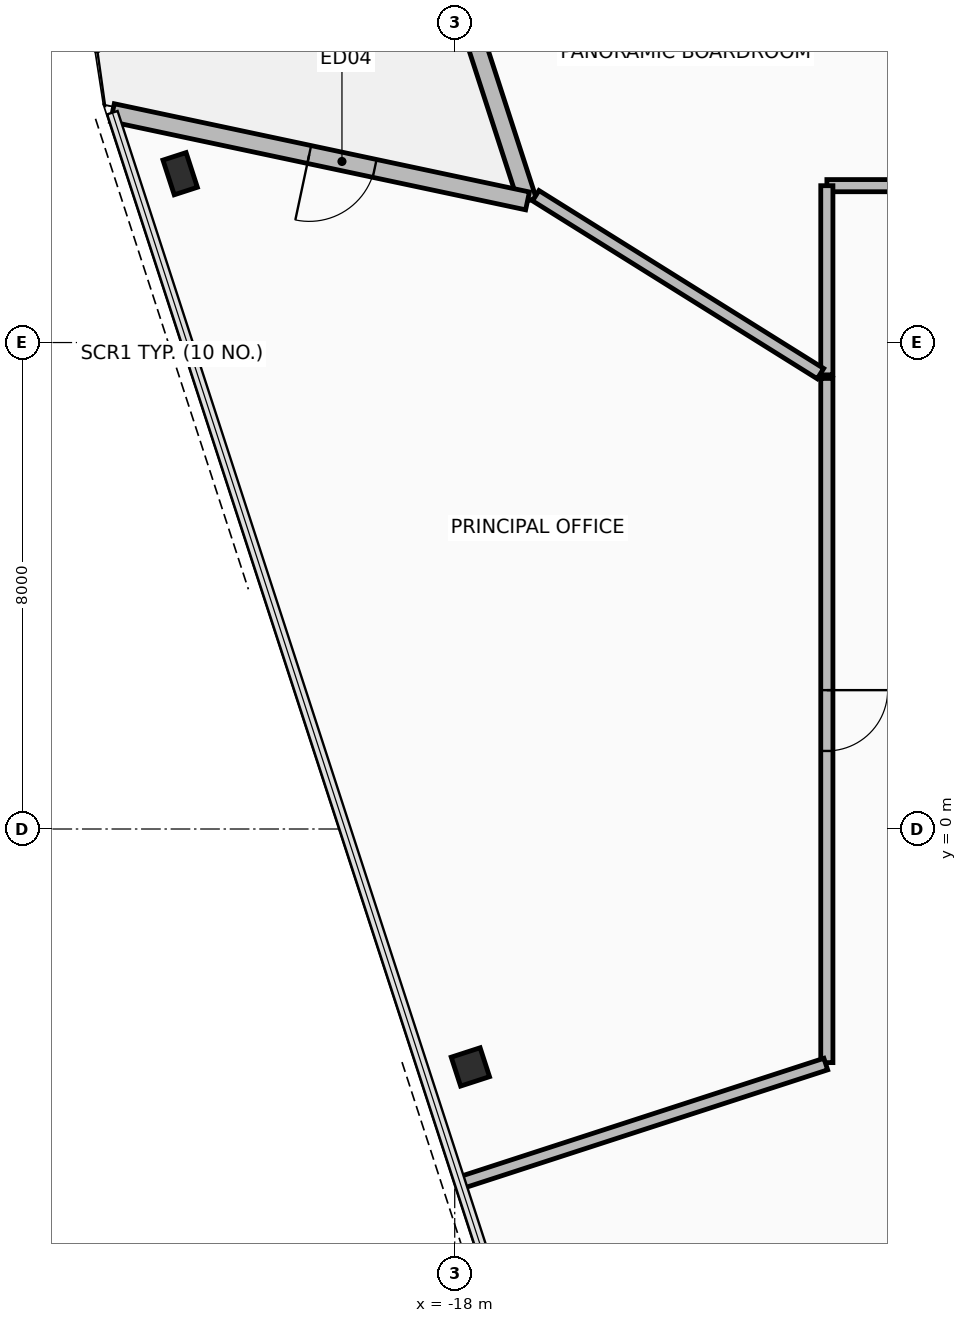
"""IFC4 building model, lengths in metres.
Left out: names, types, materials, properties, quantities, classifications, styles, units other than length and angle.
Written with IfcOpenShell. Run it as: python <this file> out.ifc"""

import sys

from ifc_helpers import new_model, si_unit, direction, frame, frame_2d, origin, origin_2d, place, context, subcontext, project, spatial, rectangle, hollow_rectangle, extrude, element, fill, save


model = new_model("IFC4")
c1 = context("Model", 3, precision=1e-05, world=origin(), true_north=direction((0.0, 1.0)))
c2 = subcontext(c1, "Body", "Model", "MODEL_VIEW")
j1 = project(units=[si_unit("LENGTHUNIT", "METRE"), si_unit("PLANEANGLEUNIT", "RADIAN")], contexts=[c1])
p1 = place(None, origin())
s1 = spatial("IfcSite", under=j1, at=p1, CompositionType="ELEMENT")
p2 = place(p1, origin())
s2 = spatial("IfcBuilding", under=s1, at=p2, CompositionType="ELEMENT")
p3 = place(p2, frame((0.0, 0.0, 200.45)))
s3 = spatial("IfcBuildingStorey", under=s2, at=p3, CompositionType="ELEMENT", Elevation=200.45)
p4 = place(p3, frame((-22.515, 10.777, 0.0), z_axis=(0.0, 0.0, 1.0), x_axis=(-0.309016994375, 0.951056516295, 0.0)))
e1 = element("IfcColumn", 1, at=p4, inside=s3, PredefinedType="COLUMN", context=c2, shape_type="SweptSolid", body=[
    extrude(hollow_rectangle(XDim=0.4, YDim=0.6, WallThickness=0.03, at=origin_2d()), origin(), (0.0, 0.0, 1.0), 3.6),
])
p5 = place(p3, frame((-17.743, -3.913, 0.0), z_axis=(0.0, 0.0, 1.0), x_axis=(-0.309016994375, 0.951056516295, 0.0)))
e2 = element("IfcColumn", 2, at=p5, inside=s3, PredefinedType="COLUMN", context=c2, shape_type="SweptSolid", body=[
    extrude(hollow_rectangle(XDim=0.5, YDim=0.5, WallThickness=0.032, at=origin_2d()), origin(), (0.0, 0.0, 1.0), 3.6),
])
p6 = place(p3, frame((-18.96, 16.968, 0.0), z_axis=(0.0, 0.0, 1.0), x_axis=(0.309030708092, -0.951052060329, 0.0)))
e3 = element("IfcWall", 3, at=p6, inside=s3, PredefinedType="STANDARD", context=c2, shape_type="SweptSolid", body=[
    extrude(rectangle(XDim=6.98, YDim=0.3, at=frame_2d((3.49, 0.0))), origin(), (0.0, 0.0, 1.0), 2.715),
])
p7 = place(p6, frame((2.69, 0.0, 0.335)))
e4 = element("IfcOpeningElement", 4, at=p7, cuts=e3, PredefinedType="OPENING", context=c2, shape_type="SweptSolid", body=[
    extrude(rectangle(XDim=1.6, YDim=2.2, at=frame_2d((0.8, 1.1))), frame((0.0, 0.16, 0.0), z_axis=(0.0, -1.0, 0.0), x_axis=(1.0, 0.0, 0.0)), (0.0, 0.0, 1.0), 0.32),
])
p8 = place(p3, frame((-16.803, 10.329, 0.0), z_axis=(0.0, 0.0, 1.0), x_axis=(-0.9781486268, 0.207906863497, 0.0)))
e5 = element("IfcWall", 5, at=p8, inside=s3, PredefinedType="STANDARD", context=c2, shape_type="SweptSolid", body=[
    extrude(rectangle(XDim=6.98, YDim=0.3, at=frame_2d((3.49, 0.0))), origin(), (0.0, 0.0, 1.0), 2.715),
])
p9 = place(p8, frame((2.57, 0.0, 0.0)))
e6 = element("IfcOpeningElement", 6, at=p9, cuts=e5, PredefinedType="OPENING", context=c2, shape_type="SweptSolid", body=[
    extrude(rectangle(XDim=1.1, YDim=2.2, at=frame_2d((0.55, 1.1))), frame((0.0, 0.16, 0.0), z_axis=(0.0, -1.0, 0.0), x_axis=(1.0, 0.0, 0.0)), (0.0, 0.0, 1.0), 0.32),
])
p10 = place(p3, frame((-1.516, 10.58, 0.0), z_axis=(0.0, 0.0, 1.0), x_axis=(-1.0, 0.0, 0.0)))
e7 = element("IfcWall", 7, at=p10, inside=s3, PredefinedType="PARTITIONING", context=c2, shape_type="SweptSolid", body=[
    extrude(rectangle(XDim=10.364, YDim=0.2, at=frame_2d((5.182, 0.0))), origin(), (0.0, 0.0, 1.0), 2.865),
])
p11 = place(p10, frame((4.582, 0.0, 0.0)))
e8 = element("IfcOpeningElement", 8, at=p11, cuts=e7, PredefinedType="OPENING", context=c2, shape_type="SweptSolid", body=[
    extrude(rectangle(XDim=1.2, YDim=2.15, at=frame_2d((0.6, 1.075))), frame((0.0, 0.11, 0.0), z_axis=(0.0, -1.0, 0.0), x_axis=(1.0, 0.0, 0.0)), (0.0, 0.0, 1.0), 0.22),
])
p12 = place(p3, frame((-11.88, 10.579, 0.0), z_axis=(0.0, 0.0, 1.0), x_axis=(0.0, -1.0, 0.0)))
e9 = element("IfcWall", 9, at=p12, inside=s3, PredefinedType="PARTITIONING", context=c2, shape_type="SweptSolid", body=[
    extrude(rectangle(XDim=3.111, YDim=0.2, at=frame_2d((1.555, 0.0))), origin(), (0.0, 0.0, 1.0), 2.765),
])
p13 = place(p3, frame((-11.985, 7.489, 0.0), z_axis=(0.0, 0.0, 1.0), x_axis=(-0.848035563326, 0.529939320427, 0.0)))
e10 = element("IfcWall", 10, at=p13, inside=s3, PredefinedType="PARTITIONING", context=c2, shape_type="SweptSolid", body=[
    extrude(rectangle(XDim=5.521, YDim=0.2, at=frame_2d((2.761, 0.0))), origin(), (0.0, 0.0, 1.0), 2.865),
])
p14 = place(p3, frame((-11.88, 7.41, 0.0), z_axis=(0.0, 0.0, 1.0), x_axis=(0.0, -1.0, 0.0)))
e11 = element("IfcWall", 11, at=p14, inside=s3, PredefinedType="PARTITIONING", context=c2, shape_type="SweptSolid", body=[
    extrude(rectangle(XDim=11.251, YDim=0.2, at=frame_2d((5.626, 0.0))), origin(), (0.0, 0.0, 1.0), 3.42),
])
p15 = place(p14, frame((5.126, 0.0, 0.0)))
e12 = element("IfcOpeningElement", 12, at=p15, cuts=e11, PredefinedType="OPENING", context=c2, shape_type="SweptSolid", body=[
    extrude(rectangle(XDim=1.0, YDim=2.15, at=frame_2d((0.5, 1.075))), frame((0.0, 0.11, 0.0), z_axis=(0.0, -1.0, 0.0), x_axis=(1.0, 0.0, 0.0)), (0.0, 0.0, 1.0), 0.22),
])
p16 = place(p3, frame((-11.897, -3.866, 0.0), z_axis=(0.0, 0.0, 1.0), x_axis=(-0.951062833603, -0.308997551024, 0.0)))
e13 = element("IfcWall", 13, at=p16, inside=s3, PredefinedType="PARTITIONING", context=c2, shape_type="SweptSolid", body=[
    extrude(rectangle(XDim=6.299, YDim=0.2, at=frame_2d((3.149, 0.0))), origin(), (0.0, 0.0, 1.0), 2.715),
])
p17 = place(p9, frame((1.1, 0.0, 0.0), z_axis=(0.0, 0.0, 1.0), x_axis=(-1.0, 0.0, 0.0)))
e14 = element("IfcDoor", 14, at=p17, inside=s3, OperationType="SINGLE_SWING_LEFT", PredefinedType="DOOR", context=c2, shape_type="SweptSolid", body=[
    extrude(rectangle(XDim=1.1, YDim=2.2, at=frame_2d((0.55, 1.1))), frame((0.0, 0.025, 0.0), z_axis=(0.0, -1.0, 0.0), x_axis=(1.0, 0.0, 0.0)), (0.0, 0.0, 1.0), 0.05),
])
fill(e6, e14)
p18 = place(p15, origin())
e15 = element("IfcDoor", 15, at=p18, inside=s3, OperationType="SINGLE_SWING_RIGHT", PredefinedType="DOOR", context=c2, shape_type="SweptSolid", body=[
    extrude(rectangle(XDim=1.0, YDim=2.15, at=frame_2d((0.5, 1.075))), frame((0.0, 0.025, 0.0), z_axis=(0.0, -1.0, 0.0), x_axis=(1.0, 0.0, 0.0)), (0.0, 0.0, 1.0), 0.05),
])
fill(e12, e15)
save(model, sys.argv[1])
